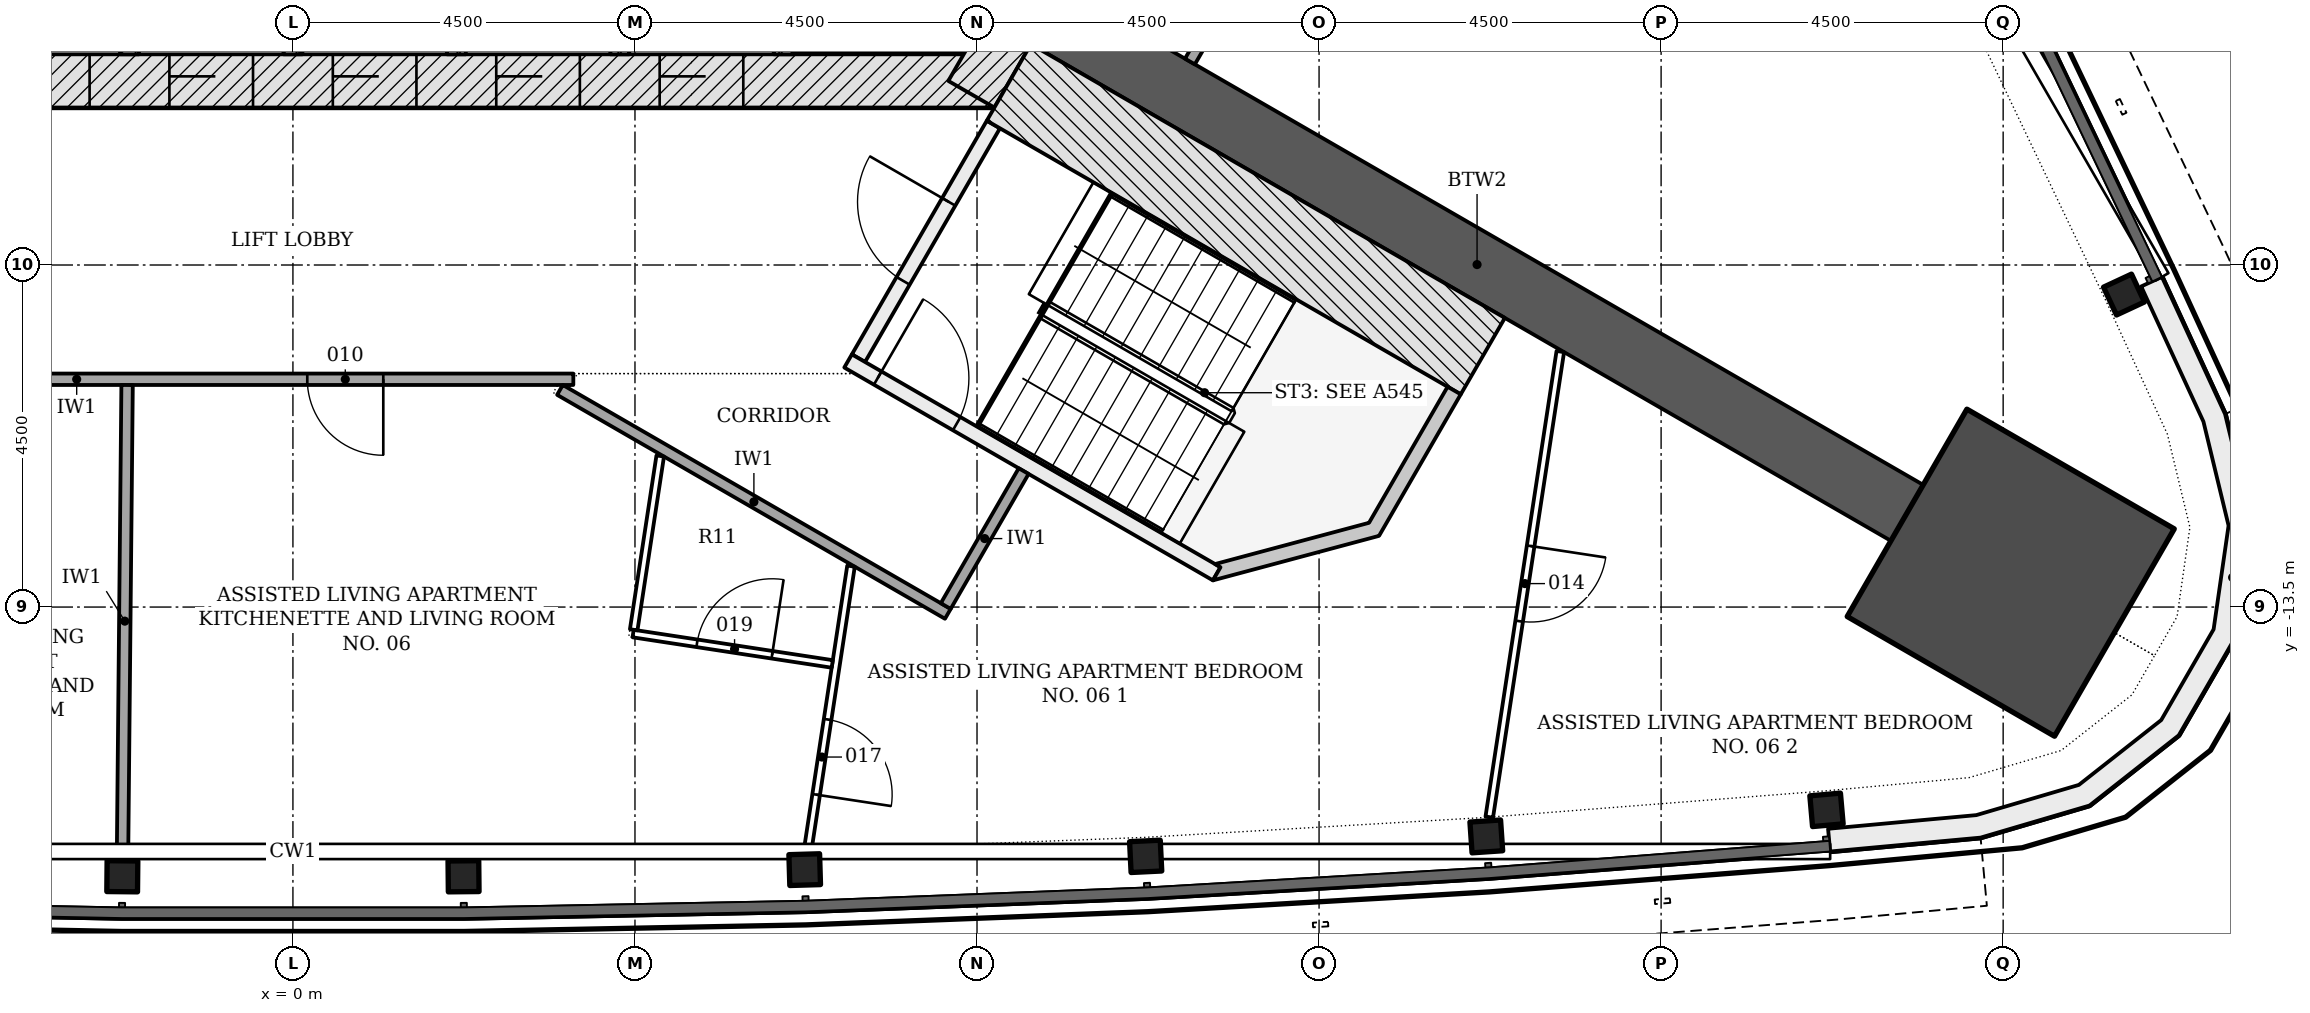
"""IFC4 building model, lengths in metres.
Left out: names, types, materials, properties, quantities, classifications, styles, units other than length and angle.
Written with IfcOpenShell. Run it as: python <this file> out.ifc"""

import sys

from ifc_helpers import new_model, si_unit, direction, frame, frame_2d, origin, origin_2d, place, context, subcontext, project, spatial, polyline, rectangle, i_section, outline, extrude, element, fill, save


model = new_model("IFC4")
c1 = context("Model", 3, precision=1e-05, world=origin(), true_north=direction((0.0, 1.0)))
c2 = subcontext(c1, "Body", "Model", "MODEL_VIEW")
j1 = project(units=[si_unit("LENGTHUNIT", "METRE"), si_unit("PLANEANGLEUNIT", "RADIAN")], contexts=[c1])
p1 = place(None, origin())
s1 = spatial("IfcSite", under=j1, at=p1, CompositionType="ELEMENT")
p2 = place(p1, origin())
s2 = spatial("IfcBuilding", under=s1, at=p2, CompositionType="ELEMENT")
p3 = place(p2, frame((0.0, 0.0, 79.8)))
s3 = spatial("IfcBuildingStorey", under=s2, at=p3, CompositionType="ELEMENT", Elevation=79.8)
p4 = place(p3, frame((-9.229, -6.578, -0.2), z_axis=(0.0, 0.0, 1.0), x_axis=(1.0, 0.0, 0.0)))
e1 = element("IfcWall", 1, at=p4, inside=s3, PredefinedType="SHEAR", context=c2, shape_type="SweptSolid", body=[
    extrude(rectangle(XDim=18.458, YDim=0.7, at=frame_2d((9.229, 0.0))), origin(), (0.0, 0.0, 1.0), 3.6),
])
p5 = place(p4, frame((3.304, 0.0, 0.2)))
e2 = element("IfcOpeningElement", 2, at=p5, cuts=e1, PredefinedType="OPENING", context=c2, shape_type="SweptSolid", body=[
    extrude(rectangle(XDim=1.1, YDim=2.1, at=frame_2d((0.55, 1.05))), frame((0.0, 0.36, 0.0), z_axis=(0.0, -1.0, 0.0), x_axis=(1.0, 0.0, 0.0)), (0.0, 0.0, 1.0), 0.72),
])
p6 = place(p4, frame((5.454, 0.0, 0.2)))
e3 = element("IfcOpeningElement", 3, at=p6, cuts=e1, PredefinedType="OPENING", context=c2, shape_type="SweptSolid", body=[
    extrude(rectangle(XDim=1.1, YDim=2.1, at=frame_2d((0.55, 1.05))), frame((0.0, 0.36, 0.0), z_axis=(0.0, -1.0, 0.0), x_axis=(1.0, 0.0, 0.0)), (0.0, 0.0, 1.0), 0.72),
])
p7 = place(p4, frame((7.604, 0.0, 0.2)))
e4 = element("IfcOpeningElement", 4, at=p7, cuts=e1, PredefinedType="OPENING", context=c2, shape_type="SweptSolid", body=[
    extrude(rectangle(XDim=1.1, YDim=2.1, at=frame_2d((0.55, 1.05))), frame((0.0, 0.36, 0.0), z_axis=(0.0, -1.0, 0.0), x_axis=(1.0, 0.0, 0.0)), (0.0, 0.0, 1.0), 0.72),
])
p8 = place(p4, frame((9.754, 0.0, 0.2)))
e5 = element("IfcOpeningElement", 5, at=p8, cuts=e1, PredefinedType="OPENING", context=c2, shape_type="SweptSolid", body=[
    extrude(rectangle(XDim=1.1, YDim=2.1, at=frame_2d((0.55, 1.05))), frame((0.0, 0.36, 0.0), z_axis=(0.0, -1.0, 0.0), x_axis=(1.0, 0.0, 0.0)), (0.0, 0.0, 1.0), 0.72),
])
p9 = place(p4, frame((11.904, 0.0, 0.2)))
e6 = element("IfcOpeningElement", 6, at=p9, cuts=e1, PredefinedType="OPENING", context=c2, shape_type="SweptSolid", body=[
    extrude(rectangle(XDim=1.1, YDim=2.1, at=frame_2d((0.55, 1.05))), frame((0.0, 0.36, 0.0), z_axis=(0.0, -1.0, 0.0), x_axis=(1.0, 0.0, 0.0)), (0.0, 0.0, 1.0), 0.72),
])
p10 = place(p4, frame((14.054, 0.0, 0.2)))
e7 = element("IfcOpeningElement", 7, at=p10, cuts=e1, PredefinedType="OPENING", context=c2, shape_type="SweptSolid", body=[
    extrude(rectangle(XDim=1.1, YDim=2.1, at=frame_2d((0.55, 1.05))), frame((0.0, 0.36, 0.0), z_axis=(0.0, -1.0, 0.0), x_axis=(1.0, 0.0, 0.0)), (0.0, 0.0, 1.0), 0.72),
])
p11 = place(p4, frame((1.026, 0.0, 0.2)))
e8 = element("IfcOpeningElement", 8, at=p11, cuts=e1, PredefinedType="OPENING", context=c2, shape_type="SweptSolid", body=[
    extrude(rectangle(XDim=0.9, YDim=2.1, at=frame_2d((0.45, 1.05))), frame((0.0, 0.36, 0.0), z_axis=(0.0, -1.0, 0.0), x_axis=(1.0, 0.0, 0.0)), (0.0, 0.0, 1.0), 0.72),
])
p12 = place(p3, frame((8.926, -6.753, -0.2), z_axis=(0.0, 0.0, 1.0), x_axis=(0.500042739161, 0.866000726912, 0.0)))
e9 = element("IfcWall", 9, at=p12, inside=s3, PredefinedType="SHEAR", context=c2, shape_type="SweptSolid", body=[
    extrude(rectangle(XDim=2.771, YDim=0.7, at=frame_2d((1.386, 0.0))), origin(), (0.0, 0.0, 1.0), 3.6),
])
p13 = place(p3, frame((9.922, -5.728, -0.2), z_axis=(0.0, 0.0, 1.0), x_axis=(0.866026565165, -0.499997988424, 0.0)))
e10 = element("IfcWall", 10, at=p13, inside=s3, PredefinedType="SHEAR", context=c2, shape_type="SweptSolid", body=[
    extrude(rectangle(XDim=13.064, YDim=0.85, at=frame_2d((6.532, 0.0))), origin(), (0.0, 0.0, 1.0), 3.6),
])
p14 = place(p3, frame((22.6, -13.048, -0.2), z_axis=(0.0, 0.0, 1.0), x_axis=(0.866025403784, -0.5, 0.0)))
e11 = element("IfcColumn", 11, at=p14, inside=s3, PredefinedType="COLUMN", context=c2, shape_type="SweptSolid", body=[
    extrude(rectangle(XDim=3.15, YDim=3.15, at=origin_2d()), origin(), (0.0, 0.0, 1.0), 3.6),
])
for number, where, z_axis, x_axis in (
    (12, (-2.245, -17.042, -0.2), (0.0, 0.0, 1.0), (1.0, -0.01, 0.0)),
    (13, (2.245, -17.042, -0.2), (0.0, 0.0, 1.0), (1.0, 0.01, 0.0)),
    (14, (6.733, -16.954, -0.2), (0.0, 0.0, 1.0), (1.0, 0.029, 0.0)),
    (15, (11.219, -16.78, -0.2), (0.0, 0.0, 1.0), (0.999, 0.049, 0.0)),
    (16, (15.7, -16.517, -0.2), (0.0, 0.0, 1.0), (0.998, 0.068, 0.0)),
    (17, (20.176, -16.168, -0.2), (0.0, 0.0, 1.0), (0.996, 0.088, 0.0)),
    (18, (24.09, -9.389, -0.2), (0.0, 0.0, 1.0), (-0.422, 0.906, 0.0)),
):
    element("IfcColumn", number, at=place(p3, frame(where, z_axis=z_axis, x_axis=x_axis)), inside=s3, PredefinedType="COLUMN", context=c2, shape_type="SweptSolid", body=[
        extrude(i_section(OverallWidth=0.404, OverallDepth=0.406, WebThickness=0.027, FlangeThickness=0.044, FilletRadius=0.015, at=origin_2d()), origin(), (0.0, 0.0, 1.0), 3.6),
    ])
p15 = place(p3, origin())
e19 = element("IfcWall", 19, at=p15, inside=s3, PredefinedType="NOTDEFINED", context=c2, shape_type="SweptSolid", body=[
    extrude(outline(polyline([(20.224, -16.716), (22.203, -16.533), (23.636, -16.111), (24.811, -15.187), (25.558, -13.893), (25.771, -12.414), (25.42, -10.962), (24.588, -9.157), (24.316, -9.282), (25.135, -11.061), (25.466, -12.428), (25.269, -13.793), (24.58, -14.987), (23.496, -15.84), (22.146, -16.237), (20.197, -16.417), (20.224, -16.716)])), origin(), (0.0, 0.0, 1.0), 3.3),
])
for number, where, z_axis, x_axis in (
    (20, (-2.15, -6.228, -0.2), (0.0, 0.0, 1.0), (0.0, 1.0, 0.0)),
    (21, (0.0, -6.228, -0.2), (0.0, 0.0, 1.0), (0.0, 1.0, 0.0)),
    (22, (2.15, -6.228, -0.2), (0.0, 0.0, 1.0), (0.0, 1.0, 0.0)),
    (23, (4.3, -6.228, -0.2), (0.0, 0.0, 1.0), (0.0, 1.0, 0.0)),
    (24, (6.45, -6.228, -0.2), (0.0, 0.0, 1.0), (0.0, 1.0, 0.0)),
):
    element("IfcWall", number, at=place(p3, frame(where, z_axis=z_axis, x_axis=x_axis)), inside=s3, PredefinedType="PARTITIONING", context=c2, shape_type="SweptSolid", body=[
        extrude(rectangle(XDim=2.5, YDim=0.25, at=frame_2d((1.25, 0.0))), origin(), (0.0, 0.0, 1.0), 3.6),
    ])
p16 = place(p3, frame((7.44, -10.226, -0.2), z_axis=(0.0, 0.0, 1.0), x_axis=(0.500022077904, 0.866012656725, 0.0)))
e25 = element("IfcWall", 25, at=p16, inside=s3, PredefinedType="SHEAR", context=c2, shape_type="SweptSolid", body=[
    extrude(rectangle(XDim=3.55, YDim=0.2, at=frame_2d((1.775, 0.0))), origin(), (0.0, 0.0, 1.0), 3.6),
])
p17 = place(p16, frame((1.175, 0.0, 0.2)))
e26 = element("IfcOpeningElement", 26, at=p17, cuts=e25, PredefinedType="OPENING", context=c2, shape_type="SweptSolid", body=[
    extrude(rectangle(XDim=1.2, YDim=2.1, at=frame_2d((0.6, 1.05))), frame((0.0, 0.11, 0.0), z_axis=(0.0, -1.0, 0.0), x_axis=(1.0, 0.0, 0.0)), (0.0, 0.0, 1.0), 0.22),
])
p18 = place(p3, frame((7.304, -10.262, -0.2), z_axis=(0.0, 0.0, 1.0), x_axis=(0.866026594901, -0.49999793692, 0.0)))
e27 = element("IfcWall", 27, at=p18, inside=s3, PredefinedType="SHEAR", context=c2, shape_type="SweptSolid", body=[
    extrude(rectangle(XDim=5.6, YDim=0.2, at=frame_2d((2.8, 0.0))), origin(), (0.0, 0.0, 1.0), 3.6),
])
p19 = place(p18, frame((0.45, 0.0, 0.2)))
e28 = element("IfcOpeningElement", 28, at=p19, cuts=e27, PredefinedType="OPENING", context=c2, shape_type="SweptSolid", body=[
    extrude(rectangle(XDim=1.2, YDim=2.1, at=frame_2d((0.6, 1.05))), frame((0.0, 0.11, 0.0), z_axis=(0.0, -1.0, 0.0), x_axis=(1.0, 0.0, 0.0)), (0.0, 0.0, 1.0), 0.22),
])
p20 = place(p3, frame((9.419, -6.599, -0.2), z_axis=(0.0, 0.0, 1.0), x_axis=(0.866033125095, -0.499986626058, 0.0)))
e29 = element("IfcWall", 29, at=p20, inside=s3, PredefinedType="SHEAR", context=c2, shape_type="SweptSolid", body=[
    extrude(rectangle(XDim=7.2, YDim=1.161, at=frame_2d((3.6, 0.0))), origin(), (0.0, 0.0, 1.0), 3.6),
])
p21 = place(p3, frame((0.0, 0.0, -0.2)))
e30 = element("IfcWall", 30, at=p21, inside=s3, PredefinedType="SHEAR", context=c2, shape_type="SweptSolid", body=[
    extrude(outline(polyline([(12.104, -13.149), (14.289, -12.563), (15.364, -10.701), (15.191, -10.601), (14.157, -12.392), (12.132, -12.934), (12.204, -12.976), (12.204, -12.976), (12.204, -12.976), (12.204, -12.976), (12.204, -12.976), (12.204, -12.976), (12.204, -12.976), (12.204, -12.976), (12.204, -12.976), (12.204, -12.976), (12.204, -12.976), (12.204, -12.976), (12.204, -12.976), (12.204, -12.976), (12.204, -12.976), (12.204, -12.976), (12.204, -12.976), (12.104, -13.149)])), origin(), (0.0, 0.0, 1.0), 3.6),
])
p22 = place(p3, frame((3.689, -10.503, 0.0), z_axis=(0.0, 0.0, 1.0), x_axis=(-1.0, 0.0, 0.0)))
e31 = element("IfcWall", 31, at=p22, inside=s3, PredefinedType="PARTITIONING", context=c2, shape_type="SweptSolid", body=[
    extrude(rectangle(XDim=13.068, YDim=0.15, at=frame_2d((6.534, 0.0))), origin(), (0.0, 0.0, 1.0), 2.778),
])
p23 = place(p22, frame((7.566, 0.0, 0.0)))
e32 = element("IfcOpeningElement", 32, at=p23, cuts=e31, PredefinedType="OPENING", context=c2, shape_type="SweptSolid", body=[
    extrude(rectangle(XDim=1.0, YDim=2.1, at=frame_2d((0.5, 1.05))), frame((0.0, 0.085, 0.0), z_axis=(0.0, -1.0, 0.0), x_axis=(1.0, 0.0, 0.0)), (0.0, 0.0, 1.0), 0.17),
])
p24 = place(p22, frame((2.5, 0.0, 0.0)))
e33 = element("IfcOpeningElement", 33, at=p24, cuts=e31, PredefinedType="OPENING", context=c2, shape_type="SweptSolid", body=[
    extrude(rectangle(XDim=1.0, YDim=2.1, at=frame_2d((0.5, 1.05))), frame((0.0, 0.085, 0.0), z_axis=(0.0, -1.0, 0.0), x_axis=(1.0, 0.0, 0.0)), (0.0, 0.0, 1.0), 0.17),
])
p25 = place(p3, frame((3.513, -10.643, 0.0), z_axis=(0.0, 0.0, 1.0), x_axis=(0.866039313704, -0.499975906538, 0.0)))
e34 = element("IfcWall", 34, at=p25, inside=s3, PredefinedType="PARTITIONING", context=c2, shape_type="SweptSolid", body=[
    extrude(rectangle(XDim=5.892, YDim=0.15, at=frame_2d((2.946, 0.0))), origin(), (0.0, 0.0, 1.0), 2.778),
])
p26 = place(p3, frame((8.589, -13.487, 0.0), z_axis=(0.0, 0.0, 1.0), x_axis=(0.499956128963, 0.866050731258, 0.0)))
e35 = element("IfcWall", 35, at=p26, inside=s3, PredefinedType="PARTITIONING", context=c2, shape_type="SweptSolid", body=[
    extrude(rectangle(XDim=2.05, YDim=0.15, at=frame_2d((1.025, 0.0))), origin(), (0.0, 0.0, 1.0), 3.4),
])
p27 = place(p3, frame((11.801, -6.323, 0.0), z_axis=(0.0, 0.0, 1.0), x_axis=(0.500058665202, 0.865991530765, 0.0)))
e36 = element("IfcWall", 36, at=p27, inside=s3, PredefinedType="PARTITIONING", context=c2, shape_type="SweptSolid", body=[
    extrude(rectangle(XDim=1.969, YDim=0.15, at=frame_2d((0.985, 0.0))), origin(), (0.0, 0.0, 1.0), 2.778),
])
p28 = place(p3, frame((-2.242, -16.792, 0.0), z_axis=(0.0, 0.0, 1.0), x_axis=(0.009744517475, 0.999952521062, 0.0)))
e37 = element("IfcWall", 37, at=p28, inside=s3, PredefinedType="PARTITIONING", context=c2, shape_type="SweptSolid", body=[
    extrude(rectangle(XDim=6.213, YDim=0.15, at=frame_2d((3.107, 0.0))), origin(), (0.0, 0.0, 1.0), 2.778),
])
p29 = place(p3, frame((16.674, -10.138, 0.0), z_axis=(0.0, 0.0, 1.0), x_axis=(-0.150869779888, -0.98855364524, 0.0)))
e38 = element("IfcWall", 38, at=p29, inside=s3, PredefinedType="PARTITIONING", context=c2, shape_type="SweptSolid", body=[
    extrude(rectangle(XDim=6.196, YDim=0.1, at=frame_2d((3.098, 0.0))), origin(), (0.0, 0.0, 1.0), 2.923),
])
p30 = place(p29, frame((2.588, 0.0, 0.0)))
e39 = element("IfcOpeningElement", 39, at=p30, cuts=e38, PredefinedType="OPENING", context=c2, shape_type="SweptSolid", body=[
    extrude(rectangle(XDim=1.0, YDim=2.1, at=frame_2d((0.5, 1.05))), frame((0.0, 0.06, 0.0), z_axis=(0.0, -1.0, 0.0), x_axis=(1.0, 0.0, 0.0)), (0.0, 0.0, 1.0), 0.12),
])
p31 = place(p3, frame((7.342, -12.961, 0.0), z_axis=(0.0, 0.0, 1.0), x_axis=(-0.150825771547, -0.988560360644, 0.0)))
e40 = element("IfcWall", 40, at=p31, inside=s3, PredefinedType="PARTITIONING", context=c2, shape_type="SweptSolid", body=[
    extrude(rectangle(XDim=3.784, YDim=0.1, at=frame_2d((1.892, 0.0))), origin(), (0.0, 0.0, 1.0), 2.778),
])
p32 = place(p31, frame((2.041, 0.0, 0.0)))
e41 = element("IfcOpeningElement", 41, at=p32, cuts=e40, PredefinedType="OPENING", context=c2, shape_type="SweptSolid", body=[
    extrude(rectangle(XDim=1.0, YDim=2.1, at=frame_2d((0.5, 1.05))), frame((0.0, 0.06, 0.0), z_axis=(0.0, -1.0, 0.0), x_axis=(1.0, 0.0, 0.0)), (0.0, 0.0, 1.0), 0.12),
])
p33 = place(p3, frame((4.476, -13.849, 0.0), z_axis=(0.0, 0.0, 1.0), x_axis=(0.988563667888, -0.150804093219, 0.0)))
e42 = element("IfcWall", 42, at=p33, inside=s3, PredefinedType="PARTITIONING", context=c2, shape_type="SweptSolid", body=[
    extrude(rectangle(XDim=2.65, YDim=0.1, at=frame_2d((1.325, 0.0))), origin(), (0.0, 0.0, 1.0), 2.778),
])
p34 = place(p33, frame((0.85, 0.0, 0.0)))
e43 = element("IfcOpeningElement", 43, at=p34, cuts=e42, PredefinedType="OPENING", context=c2, shape_type="SweptSolid", body=[
    extrude(rectangle(XDim=1.0, YDim=2.1, at=frame_2d((0.5, 1.05))), frame((0.0, 0.06, 0.0), z_axis=(0.0, -1.0, 0.0), x_axis=(1.0, 0.0, 0.0)), (0.0, 0.0, 1.0), 0.12),
])
p35 = place(p3, frame((4.832, -11.512, 0.0), z_axis=(0.0, 0.0, 1.0), x_axis=(-0.150899365419, -0.988549129541, 0.0)))
e44 = element("IfcWall", 44, at=p35, inside=s3, PredefinedType="PARTITIONING", context=c2, shape_type="SweptSolid", body=[
    extrude(rectangle(XDim=2.314, YDim=0.1, at=frame_2d((1.157, 0.0))), origin(), (0.0, 0.0, 1.0), 3.4),
])
p36 = place(p6, origin())
e45 = element("IfcDoor", 45, at=p36, inside=s3, OperationType="DOUBLE_DOOR_SLIDING", PredefinedType="DOOR", context=c2, shape_type="SweptSolid", body=[
    extrude(rectangle(XDim=1.1, YDim=2.1, at=frame_2d((0.55, 1.05))), frame((0.0, 0.025, 0.0), z_axis=(0.0, -1.0, 0.0), x_axis=(1.0, 0.0, 0.0)), (0.0, 0.0, 1.0), 0.05),
])
fill(e3, e45)
p37 = place(p7, origin())
e46 = element("IfcDoor", 46, at=p37, inside=s3, OperationType="DOUBLE_DOOR_SLIDING", PredefinedType="DOOR", context=c2, shape_type="SweptSolid", body=[
    extrude(rectangle(XDim=1.1, YDim=2.1, at=frame_2d((0.55, 1.05))), frame((0.0, 0.025, 0.0), z_axis=(0.0, -1.0, 0.0), x_axis=(1.0, 0.0, 0.0)), (0.0, 0.0, 1.0), 0.05),
])
fill(e4, e46)
p38 = place(p8, origin())
e47 = element("IfcDoor", 47, at=p38, inside=s3, OperationType="DOUBLE_DOOR_SLIDING", PredefinedType="DOOR", context=c2, shape_type="SweptSolid", body=[
    extrude(rectangle(XDim=1.1, YDim=2.1, at=frame_2d((0.55, 1.05))), frame((0.0, 0.025, 0.0), z_axis=(0.0, -1.0, 0.0), x_axis=(1.0, 0.0, 0.0)), (0.0, 0.0, 1.0), 0.05),
])
fill(e5, e47)
p39 = place(p9, origin())
e48 = element("IfcDoor", 48, at=p39, inside=s3, OperationType="DOUBLE_DOOR_SLIDING", PredefinedType="DOOR", context=c2, shape_type="SweptSolid", body=[
    extrude(rectangle(XDim=1.1, YDim=2.1, at=frame_2d((0.55, 1.05))), frame((0.0, 0.025, 0.0), z_axis=(0.0, -1.0, 0.0), x_axis=(1.0, 0.0, 0.0)), (0.0, 0.0, 1.0), 0.05),
])
fill(e6, e48)
p40 = place(p10, origin())
e49 = element("IfcDoor", 49, at=p40, inside=s3, OperationType="DOUBLE_DOOR_SLIDING", PredefinedType="DOOR", context=c2, shape_type="SweptSolid", body=[
    extrude(rectangle(XDim=1.1, YDim=2.1, at=frame_2d((0.55, 1.05))), frame((0.0, 0.025, 0.0), z_axis=(0.0, -1.0, 0.0), x_axis=(1.0, 0.0, 0.0)), (0.0, 0.0, 1.0), 0.05),
])
fill(e7, e49)
p41 = place(p17, origin())
e50 = element("IfcDoor", 50, at=p41, inside=s3, OperationType="SINGLE_SWING_RIGHT", PredefinedType="DOOR", context=c2, shape_type="SweptSolid", body=[
    extrude(rectangle(XDim=1.2, YDim=2.1, at=frame_2d((0.6, 1.05))), frame((0.0, 0.025, 0.0), z_axis=(0.0, -1.0, 0.0), x_axis=(1.0, 0.0, 0.0)), (0.0, 0.0, 1.0), 0.05),
])
fill(e26, e50)
p42 = place(p19, origin())
e51 = element("IfcDoor", 51, at=p42, inside=s3, OperationType="SINGLE_SWING_LEFT", PredefinedType="DOOR", context=c2, shape_type="SweptSolid", body=[
    extrude(rectangle(XDim=1.2, YDim=2.1, at=frame_2d((0.6, 1.05))), frame((0.0, 0.025, 0.0), z_axis=(0.0, -1.0, 0.0), x_axis=(1.0, 0.0, 0.0)), (0.0, 0.0, 1.0), 0.05),
])
fill(e28, e51)
p43 = place(p24, origin())
e52 = element("IfcDoor", 52, at=p43, inside=s3, OperationType="SINGLE_SWING_LEFT", PredefinedType="DOOR", context=c2, shape_type="SweptSolid", body=[
    extrude(rectangle(XDim=1.0, YDim=2.1, at=frame_2d((0.5, 1.05))), frame((0.0, 0.025, 0.0), z_axis=(0.0, -1.0, 0.0), x_axis=(1.0, 0.0, 0.0)), (0.0, 0.0, 1.0), 0.05),
])
fill(e33, e52)
p44 = place(p30, origin())
e53 = element("IfcDoor", 53, at=p44, inside=s3, OperationType="SINGLE_SWING_LEFT", PredefinedType="DOOR", context=c2, shape_type="SweptSolid", body=[
    extrude(rectangle(XDim=1.0, YDim=2.1, at=frame_2d((0.5, 1.05))), frame((0.0, 0.025, 0.0), z_axis=(0.0, -1.0, 0.0), x_axis=(1.0, 0.0, 0.0)), (0.0, 0.0, 1.0), 0.05),
])
fill(e39, e53)
p45 = place(p32, origin())
e54 = element("IfcDoor", 54, at=p45, inside=s3, OperationType="SINGLE_SWING_RIGHT", PredefinedType="DOOR", context=c2, shape_type="SweptSolid", body=[
    extrude(rectangle(XDim=1.0, YDim=2.1, at=frame_2d((0.5, 1.05))), frame((0.0, 0.025, 0.0), z_axis=(0.0, -1.0, 0.0), x_axis=(1.0, 0.0, 0.0)), (0.0, 0.0, 1.0), 0.05),
])
fill(e41, e54)
p46 = place(p34, origin())
e55 = element("IfcDoor", 55, at=p46, inside=s3, OperationType="SINGLE_SWING_RIGHT", PredefinedType="DOOR", context=c2, shape_type="SweptSolid", body=[
    extrude(rectangle(XDim=1.0, YDim=2.1, at=frame_2d((0.5, 1.05))), frame((0.0, 0.025, 0.0), z_axis=(0.0, -1.0, 0.0), x_axis=(1.0, 0.0, 0.0)), (0.0, 0.0, 1.0), 0.05),
])
fill(e43, e55)
save(model, sys.argv[1])
